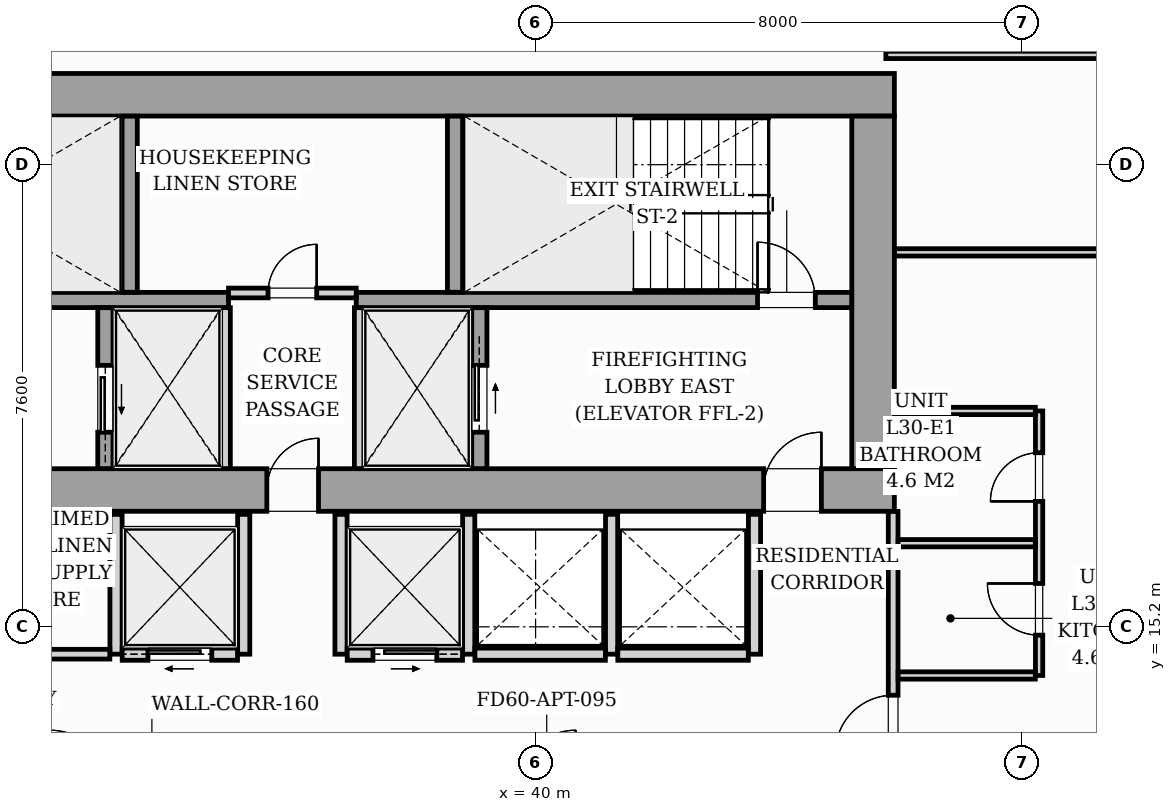
"""IFC4 building model, lengths in metres.
Left out: names, types, materials, properties, quantities, classifications, styles, units other than length and angle.
Written with IfcOpenShell. Run it as: python <this file> out.ifc"""

import sys

from ifc_helpers import new_model, si_unit, direction, frame, frame_2d, origin, origin_2d, place, context, subcontext, project, spatial, rectangle, i_section, extrude, source, transform, mapped, element, fill, save


model = new_model("IFC4")
c1 = context("Model", 3, precision=1e-05, world=origin(), true_north=direction((0.0, 1.0)))
c2 = subcontext(c1, "Body", "Model", "MODEL_VIEW")
j1 = project(units=[si_unit("LENGTHUNIT", "METRE"), si_unit("PLANEANGLEUNIT", "RADIAN")], contexts=[c1])
p1 = place(None, origin())
s1 = spatial("IfcSite", under=j1, at=p1, CompositionType="ELEMENT")
p2 = place(p1, origin())
s2 = spatial("IfcBuilding", under=s1, at=p2, CompositionType="ELEMENT")
p3 = place(p2, frame((0.0, 0.0, 106.6)))
s3 = spatial("IfcBuildingStorey", under=s2, at=p3, CompositionType="ELEMENT", Elevation=106.6)
m1 = source(origin(), c2, "Body", "SweptSolid", [
    extrude(i_section(OverallWidth=0.427, OverallDepth=0.483, WebThickness=0.051, FlangeThickness=0.082, FilletRadius=0.018, at=origin_2d()), origin(), (0.0, 0.0, 1.0), 3.196),
])
for number, where, z_axis, x_axis in (
    (1, (33.12, 17.4, 0.002), (0.0, 0.0, 1.0), (1.0, 0.0, 0.0)),
    (2, (38.88, 17.4, 0.002), (0.0, 0.0, 1.0), (1.0, 0.0, 0.0)),
    (3, (45.6, 17.4, 0.002), (0.0, 0.0, 1.0), (1.0, 0.0, 0.0)),
    (4, (33.12, 24.0, 0.002), (0.0, 0.0, 1.0), (1.0, 0.0, 0.0)),
    (5, (38.88, 24.0, 0.002), (0.0, 0.0, 1.0), (1.0, 0.0, 0.0)),
    (6, (45.6, 24.0, 0.002), (0.0, 0.0, 1.0), (1.0, 0.0, 0.0)),
):
    element("IfcColumn", number, at=place(p3, frame(where, z_axis=z_axis, x_axis=x_axis)), inside=s3, PredefinedType="PILASTER", context=c2, shape_type="MappedRepresentation", body=[
        mapped(m1, transform((0.0, 0.0, 0.0), scale=1.0)),
    ])
p4 = place(p3, frame((26.1, 17.45, 0.0), z_axis=(0.0, 0.0, 1.0), x_axis=(1.0, 0.0, 0.0)))
e7 = element("IfcWall", 7, at=p4, inside=s3, PredefinedType="SHEAR", context=c2, shape_type="SweptSolid", body=[
    extrude(rectangle(XDim=19.8, YDim=0.7, at=frame_2d((9.9, 0.0))), origin(), (0.0, 0.0, 1.0), 3.2),
])
p5 = place(p4, frame((1.05, 0.0, 0.0)))
e8 = element("IfcOpeningElement", 8, at=p5, cuts=e7, PredefinedType="OPENING", context=c2, shape_type="SweptSolid", body=[
    extrude(rectangle(XDim=0.95, YDim=2.06, at=frame_2d((0.475, 1.03))), frame((0.0, 0.36, 0.0), z_axis=(0.0, -1.0, 0.0), x_axis=(1.0, 0.0, 0.0)), (0.0, 0.0, 1.0), 0.72),
])
p6 = place(p4, frame((9.48, 0.0, 0.0)))
e9 = element("IfcOpeningElement", 9, at=p6, cuts=e7, PredefinedType="OPENING", context=c2, shape_type="SweptSolid", body=[
    extrude(rectangle(XDim=0.85, YDim=2.0, at=frame_2d((0.425, 1.0))), frame((0.0, 0.36, 0.0), z_axis=(0.0, -1.0, 0.0), x_axis=(1.0, 0.0, 0.0)), (0.0, 0.0, 1.0), 0.72),
])
p7 = place(p4, frame((17.65, 0.0, 0.0)))
e10 = element("IfcOpeningElement", 10, at=p7, cuts=e7, PredefinedType="OPENING", context=c2, shape_type="SweptSolid", body=[
    extrude(rectangle(XDim=0.95, YDim=2.06, at=frame_2d((0.475, 1.03))), frame((0.0, 0.36, 0.0), z_axis=(0.0, -1.0, 0.0), x_axis=(1.0, 0.0, 0.0)), (0.0, 0.0, 1.0), 0.72),
])
p8 = place(p3, frame((26.1, 23.95, 0.0), z_axis=(0.0, 0.0, 1.0), x_axis=(1.0, 0.0, 0.0)))
e11 = element("IfcWall", 11, at=p8, inside=s3, PredefinedType="SHEAR", context=c2, shape_type="SweptSolid", body=[
    extrude(rectangle(XDim=19.8, YDim=0.7, at=frame_2d((9.9, 0.0))), origin(), (0.0, 0.0, 1.0), 3.2),
])
p9 = place(p3, frame((45.55, 17.802, 0.0), z_axis=(0.0, 0.0, 1.0), x_axis=(0.0, 1.0, 0.0)))
e12 = element("IfcWall", 12, at=p9, inside=s3, PredefinedType="SHEAR", context=c2, shape_type="SweptSolid", body=[
    extrude(rectangle(XDim=5.796, YDim=0.7, at=frame_2d((2.898, 0.0))), origin(), (0.0, 0.0, 1.0), 3.2),
])
p10 = place(p3, frame((26.802, 20.575, 0.0), z_axis=(0.0, 0.0, 1.0), x_axis=(1.0, 0.0, 0.0)))
e13 = element("IfcWall", 13, at=p10, inside=s3, PredefinedType="SOLIDWALL", context=c2, shape_type="SweptSolid", body=[
    extrude(rectangle(XDim=8.148, YDim=0.25, at=frame_2d((4.074, 0.0))), origin(), (0.0, 0.0, 1.0), 3.2),
])
p11 = place(p10, frame((0.348, 0.0, 0.0)))
e14 = element("IfcOpeningElement", 14, at=p11, cuts=e13, PredefinedType="OPENING", context=c2, shape_type="SweptSolid", body=[
    extrude(rectangle(XDim=0.95, YDim=2.06, at=frame_2d((0.475, 1.03))), frame((0.0, 0.135, 0.0), z_axis=(0.0, -1.0, 0.0), x_axis=(1.0, 0.0, 0.0)), (0.0, 0.0, 1.0), 0.27),
])
p12 = place(p3, frame((37.05, 20.575, 0.0), z_axis=(0.0, 0.0, 1.0), x_axis=(1.0, 0.0, 0.0)))
e15 = element("IfcWall", 15, at=p12, inside=s3, PredefinedType="SOLIDWALL", context=c2, shape_type="SweptSolid", body=[
    extrude(rectangle(XDim=8.148, YDim=0.25, at=frame_2d((4.074, 0.0))), origin(), (0.0, 0.0, 1.0), 3.2),
])
p13 = place(p12, frame((6.6, 0.0, 0.0)))
e16 = element("IfcOpeningElement", 16, at=p13, cuts=e15, PredefinedType="OPENING", context=c2, shape_type="SweptSolid", body=[
    extrude(rectangle(XDim=0.95, YDim=2.06, at=frame_2d((0.475, 1.03))), frame((0.0, 0.135, 0.0), z_axis=(0.0, -1.0, 0.0), x_axis=(1.0, 0.0, 0.0)), (0.0, 0.0, 1.0), 0.27),
])
for number, where, z_axis, x_axis in (
    (17, (33.325, 20.702, 0.0), (0.0, 0.0, 1.0), (0.0, 1.0, 0.0)),
    (18, (38.675, 20.702, 0.0), (0.0, 0.0, 1.0), (0.0, 1.0, 0.0)),
):
    element("IfcWall", number, at=place(p3, frame(where, z_axis=z_axis, x_axis=x_axis)), inside=s3, PredefinedType="SOLIDWALL", context=c2, shape_type="SweptSolid", body=[
        extrude(rectangle(XDim=2.896, YDim=0.25, at=frame_2d((1.448, 0.0))), origin(), (0.0, 0.0, 1.0), 3.2),
    ])
p14 = place(p3, frame((32.925, 17.802, 0.0), z_axis=(0.0, 0.0, 1.0), x_axis=(0.0, 1.0, 0.0)))
e19 = element("IfcWall", 19, at=p14, inside=s3, PredefinedType="SOLIDWALL", context=c2, shape_type="SweptSolid", body=[
    extrude(rectangle(XDim=2.646, YDim=0.25, at=frame_2d((1.323, 0.0))), origin(), (0.0, 0.0, 1.0), 3.2),
])
p15 = place(p14, frame((0.598, 0.0, 0.0)))
e20 = element("IfcOpeningElement", 20, at=p15, cuts=e19, PredefinedType="OPENING", context=c2, shape_type="SweptSolid", body=[
    extrude(rectangle(XDim=1.1, YDim=2.08, at=frame_2d((0.55, 1.04))), frame((0.0, 0.135, 0.0), z_axis=(0.0, -1.0, 0.0), x_axis=(1.0, 0.0, 0.0)), (0.0, 0.0, 1.0), 0.27),
])
for number, where, z_axis, x_axis in (
    (21, (34.9, 17.802, 0.0), (0.0, 0.0, 1.0), (0.0, 1.0, 0.0)),
    (22, (37.1, 17.802, 0.0), (0.0, 0.0, 1.0), (0.0, 1.0, 0.0)),
):
    element("IfcWall", number, at=place(p3, frame(where, z_axis=z_axis, x_axis=x_axis)), inside=s3, PredefinedType="PARTITIONING", context=c2, shape_type="SweptSolid", body=[
        extrude(rectangle(XDim=2.646, YDim=0.16, at=frame_2d((1.323, 0.0))), origin(), (0.0, 0.0, 1.0), 2.94),
    ])
p16 = place(p3, frame((39.075, 17.802, 0.0), z_axis=(0.0, 0.0, 1.0), x_axis=(0.0, 1.0, 0.0)))
e23 = element("IfcWall", 23, at=p16, inside=s3, PredefinedType="SOLIDWALL", context=c2, shape_type="SweptSolid", body=[
    extrude(rectangle(XDim=2.646, YDim=0.25, at=frame_2d((1.323, 0.0))), origin(), (0.0, 0.0, 1.0), 3.2),
])
p17 = place(p16, frame((0.598, 0.0, 0.0)))
e24 = element("IfcOpeningElement", 24, at=p17, cuts=e23, PredefinedType="OPENING", context=c2, shape_type="SweptSolid", body=[
    extrude(rectangle(XDim=1.1, YDim=2.08, at=frame_2d((0.55, 1.04))), frame((0.0, 0.135, 0.0), z_axis=(0.0, -1.0, 0.0), x_axis=(1.0, 0.0, 0.0)), (0.0, 0.0, 1.0), 0.27),
])
p18 = place(p3, frame((34.95, 20.69, 0.0), z_axis=(0.0, 0.0, 1.0), x_axis=(1.0, 0.0, 0.0)))
e25 = element("IfcWall", 25, at=p18, inside=s3, PredefinedType="PARTITIONING", context=c2, shape_type="SweptSolid", body=[
    extrude(rectangle(XDim=2.1, YDim=0.16, at=frame_2d((1.05, 0.0))), origin(), (0.0, 0.0, 1.0), 2.94),
])
p19 = place(p18, frame((0.65, 0.0, 0.0)))
e26 = element("IfcOpeningElement", 26, at=p19, cuts=e25, PredefinedType="OPENING", context=c2, shape_type="SweptSolid", body=[
    extrude(rectangle(XDim=0.8, YDim=2.05, at=frame_2d((0.4, 1.025))), frame((0.0, 0.09, 0.0), z_axis=(0.0, -1.0, 0.0), x_axis=(1.0, 0.0, 0.0)), (0.0, 0.0, 1.0), 0.18),
])
p20 = place(p3, frame((33.1, 14.75, 0.0), z_axis=(0.0, 0.0, 1.0), x_axis=(0.0, 1.0, 0.0)))
e27 = element("IfcWall", 27, at=p20, inside=s3, PredefinedType="PARTITIONING", context=c2, shape_type="SweptSolid", body=[
    extrude(rectangle(XDim=2.3, YDim=0.2, at=frame_2d((1.15, 0.0))), origin(), (0.0, 0.0, 1.0), 2.94),
])
p21 = place(p3, frame((28.482, 14.75, 0.0), z_axis=(0.0, 0.0, 1.0), x_axis=(1.0, 0.0, 0.0)))
e28 = element("IfcWall", 28, at=p21, inside=s3, PredefinedType="PARTITIONING", context=c2, shape_type="SweptSolid", body=[
    extrude(rectangle(XDim=4.516, YDim=0.16, at=frame_2d((2.258, 0.0))), origin(), (0.0, 0.0, 1.0), 2.94),
])
p22 = place(p21, frame((1.868, 0.0, 0.0)))
e29 = element("IfcOpeningElement", 29, at=p22, cuts=e28, PredefinedType="OPENING", context=c2, shape_type="SweptSolid", body=[
    extrude(rectangle(XDim=0.8, YDim=2.05, at=frame_2d((0.4, 1.025))), frame((0.0, 0.09, 0.0), z_axis=(0.0, -1.0, 0.0), x_axis=(1.0, 0.0, 0.0)), (0.0, 0.0, 1.0), 0.18),
])
p23 = place(p3, frame((35.2, 14.75, 0.0), z_axis=(0.0, 0.0, 1.0), x_axis=(0.0, 1.0, 0.0)))
e30 = element("IfcWall", 30, at=p23, inside=s3, PredefinedType="PARTITIONING", context=c2, shape_type="SweptSolid", body=[
    extrude(rectangle(XDim=2.3, YDim=0.2, at=frame_2d((1.15, 0.0))), origin(), (0.0, 0.0, 1.0), 2.94),
])
p24 = place(p3, frame((33.202, 14.75, 0.0), z_axis=(0.0, 0.0, 1.0), x_axis=(1.0, 0.0, 0.0)))
e31 = element("IfcWall", 31, at=p24, inside=s3, PredefinedType="PARTITIONING", context=c2, shape_type="SweptSolid", body=[
    extrude(rectangle(XDim=1.896, YDim=0.2, at=frame_2d((0.948, 0.0))), origin(), (0.0, 0.0, 1.0), 2.94),
])
p25 = place(p24, frame((0.423, 0.0, 0.0)))
e32 = element("IfcOpeningElement", 32, at=p25, cuts=e31, PredefinedType="OPENING", context=c2, shape_type="SweptSolid", body=[
    extrude(rectangle(XDim=1.05, YDim=2.08, at=frame_2d((0.525, 1.04))), frame((0.0, 0.11, 0.0), z_axis=(0.0, -1.0, 0.0), x_axis=(1.0, 0.0, 0.0)), (0.0, 0.0, 1.0), 0.22),
])
for number, where, z_axis, x_axis in (
    (33, (36.8, 14.75, 0.0), (0.0, 0.0, 1.0), (0.0, 1.0, 0.0)),
    (34, (38.9, 14.75, 0.0), (0.0, 0.0, 1.0), (0.0, 1.0, 0.0)),
):
    element("IfcWall", number, at=place(p3, frame(where, z_axis=z_axis, x_axis=x_axis)), inside=s3, PredefinedType="PARTITIONING", context=c2, shape_type="SweptSolid", body=[
        extrude(rectangle(XDim=2.3, YDim=0.2, at=frame_2d((1.15, 0.0))), origin(), (0.0, 0.0, 1.0), 2.94),
    ])
p26 = place(p3, frame((36.902, 14.75, 0.0), z_axis=(0.0, 0.0, 1.0), x_axis=(1.0, 0.0, 0.0)))
e35 = element("IfcWall", 35, at=p26, inside=s3, PredefinedType="PARTITIONING", context=c2, shape_type="SweptSolid", body=[
    extrude(rectangle(XDim=1.896, YDim=0.2, at=frame_2d((0.948, 0.0))), origin(), (0.0, 0.0, 1.0), 2.94),
])
p27 = place(p26, frame((0.423, 0.0, 0.0)))
e36 = element("IfcOpeningElement", 36, at=p27, cuts=e35, PredefinedType="OPENING", context=c2, shape_type="SweptSolid", body=[
    extrude(rectangle(XDim=1.05, YDim=2.08, at=frame_2d((0.525, 1.04))), frame((0.0, 0.11, 0.0), z_axis=(0.0, -1.0, 0.0), x_axis=(1.0, 0.0, 0.0)), (0.0, 0.0, 1.0), 0.22),
])
for number, where, z_axis, x_axis in (
    (37, (41.25, 14.75, 0.0), (0.0, 0.0, 1.0), (0.0, 1.0, 0.0)),
    (38, (43.6, 14.75, 0.0), (0.0, 0.0, 1.0), (0.0, 1.0, 0.0)),
):
    element("IfcWall", number, at=place(p3, frame(where, z_axis=z_axis, x_axis=x_axis)), inside=s3, PredefinedType="PARTITIONING", context=c2, shape_type="SweptSolid", body=[
        extrude(rectangle(XDim=2.3, YDim=0.2, at=frame_2d((1.15, 0.0))), origin(), (0.0, 0.0, 1.0), 2.94),
    ])
for number, where, z_axis, x_axis in (
    (39, (39.002, 14.75, 0.0), (0.0, 0.0, 1.0), (1.0, 0.0, 0.0)),
    (40, (41.352, 14.75, 0.0), (0.0, 0.0, 1.0), (1.0, 0.0, 0.0)),
):
    element("IfcWall", number, at=place(p3, frame(where, z_axis=z_axis, x_axis=x_axis)), inside=s3, PredefinedType="PARTITIONING", context=c2, shape_type="SweptSolid", body=[
        extrude(rectangle(XDim=2.146, YDim=0.2, at=frame_2d((1.073, 0.0))), origin(), (0.0, 0.0, 1.0), 2.94),
    ])
p28 = place(p3, frame((45.88, 12.632, 0.0), z_axis=(0.0, 0.0, 1.0), x_axis=(0.0, 1.0, 0.0)))
e41 = element("IfcWall", 41, at=p28, inside=s3, PredefinedType="PARTITIONING", context=c2, shape_type="SweptSolid", body=[
    extrude(rectangle(XDim=4.466, YDim=0.16, at=frame_2d((2.233, 0.0))), origin(), (0.0, 0.0, 1.0), 2.94),
])
p29 = place(p28, frame((0.493, 0.0, 0.0)))
e42 = element("IfcOpeningElement", 42, at=p29, cuts=e41, PredefinedType="OPENING", context=c2, shape_type="SweptSolid", body=[
    extrude(rectangle(XDim=0.95, YDim=2.06, at=frame_2d((0.475, 1.03))), frame((0.0, 0.09, 0.0), z_axis=(0.0, -1.0, 0.0), x_axis=(1.0, 0.0, 0.0)), (0.0, 0.0, 1.0), 0.18),
])
p30 = place(p3, frame((48.28, 14.4, 0.0), z_axis=(0.0, 0.0, 1.0), x_axis=(0.0, 1.0, 0.0)))
e43 = element("IfcWall", 43, at=p30, inside=s3, PredefinedType="PARTITIONING", context=c2, shape_type="SweptSolid", body=[
    extrude(rectangle(XDim=4.35, YDim=0.12, at=frame_2d((2.175, 0.0))), origin(), (0.0, 0.0, 1.0), 2.94),
])
p31 = place(p30, frame((0.663, 0.0, 0.0)))
e44 = element("IfcOpeningElement", 44, at=p31, cuts=e43, PredefinedType="OPENING", context=c2, shape_type="SweptSolid", body=[
    extrude(rectangle(XDim=0.85, YDim=2.05, at=frame_2d((0.425, 1.025))), frame((0.0, 0.07, 0.0), z_axis=(0.0, -1.0, 0.0), x_axis=(1.0, 0.0, 0.0)), (0.0, 0.0, 1.0), 0.14),
])
p32 = place(p30, frame((2.863, 0.0, 0.0)))
e45 = element("IfcOpeningElement", 45, at=p32, cuts=e43, PredefinedType="OPENING", context=c2, shape_type="SweptSolid", body=[
    extrude(rectangle(XDim=0.8, YDim=2.02, at=frame_2d((0.4, 1.01))), frame((0.0, 0.07, 0.0), z_axis=(0.0, -1.0, 0.0), x_axis=(1.0, 0.0, 0.0)), (0.0, 0.0, 1.0), 0.14),
])
for number, where, z_axis, x_axis in (
    (46, (45.962, 16.575, 0.0), (0.0, 0.0, 1.0), (1.0, 0.0, 0.0)),
    (47, (45.962, 14.4, 0.0), (0.0, 0.0, 1.0), (1.0, 0.0, 0.0)),
):
    element("IfcWall", number, at=place(p3, frame(where, z_axis=z_axis, x_axis=x_axis)), inside=s3, PredefinedType="PARTITIONING", context=c2, shape_type="SweptSolid", body=[
        extrude(rectangle(XDim=2.256, YDim=0.12, at=frame_2d((1.128, 0.0))), origin(), (0.0, 0.0, 1.0), 2.94),
    ])
p33 = place(p3, frame((45.902, 18.75, 0.0), z_axis=(0.0, 0.0, 1.0), x_axis=(1.0, 0.0, 0.0)))
e48 = element("IfcWall", 48, at=p33, inside=s3, PredefinedType="PARTITIONING", context=c2, shape_type="SweptSolid", body=[
    extrude(rectangle(XDim=2.316, YDim=0.12, at=frame_2d((1.158, 0.0))), origin(), (0.0, 0.0, 1.0), 2.94),
])
p34 = place(p3, frame((45.76, 24.605, 0.0), z_axis=(0.0, 0.0, 1.0), x_axis=(1.0, 0.0, 0.0)))
e49 = element("IfcWall", 49, at=p34, inside=s3, PredefinedType="PARTITIONING", context=c2, shape_type="SweptSolid", body=[
    extrude(rectangle(XDim=22.498, YDim=0.12, at=frame_2d((11.249, 0.0))), origin(), (0.0, 0.0, 1.0), 2.94),
])
p35 = place(p34, frame((10.931, 0.0, 0.0)))
e50 = element("IfcOpeningElement", 50, at=p35, cuts=e49, PredefinedType="OPENING", context=c2, shape_type="SweptSolid", body=[
    extrude(rectangle(XDim=0.85, YDim=2.05, at=frame_2d((0.425, 1.025))), frame((0.0, 0.07, 0.0), z_axis=(0.0, -1.0, 0.0), x_axis=(1.0, 0.0, 0.0)), (0.0, 0.0, 1.0), 0.14),
])
p36 = place(p3, frame((45.902, 21.358, 0.0), z_axis=(0.0, 0.0, 1.0), x_axis=(1.0, 0.0, 0.0)))
e51 = element("IfcWall", 51, at=p36, inside=s3, PredefinedType="PARTITIONING", context=c2, shape_type="SweptSolid", body=[
    extrude(rectangle(XDim=22.668, YDim=0.12, at=frame_2d((11.334, 0.0))), origin(), (0.0, 0.0, 1.0), 2.94),
])
p37 = place(p36, frame((10.945, 0.0, 0.0)))
e52 = element("IfcOpeningElement", 52, at=p37, cuts=e51, PredefinedType="OPENING", context=c2, shape_type="SweptSolid", body=[
    extrude(rectangle(XDim=0.85, YDim=2.05, at=frame_2d((0.425, 1.025))), frame((0.0, 0.07, 0.0), z_axis=(0.0, -1.0, 0.0), x_axis=(1.0, 0.0, 0.0)), (0.0, 0.0, 1.0), 0.14),
])
m2 = source(origin(), c2, "Body", "SweptSolid", [
    extrude(rectangle(XDim=0.85, YDim=2.0, at=frame_2d((0.425, 1.0))), frame((0.0, 0.025, 0.0), z_axis=(0.0, -1.0, 0.0), x_axis=(1.0, 0.0, 0.0)), (0.0, 0.0, 1.0), 0.05),
])
p38 = place(p6, origin())
e53 = element("IfcDoor", 53, at=p38, inside=s3, OperationType="SINGLE_SWING_RIGHT", PredefinedType="DOOR", context=c2, shape_type="MappedRepresentation", body=[
    mapped(m2, transform((0.0, 0.0, 0.0), scale=1.0)),
])
fill(e9, e53)
m3 = source(origin(), c2, "Body", "SweptSolid", [
    extrude(rectangle(XDim=0.95, YDim=2.06, at=frame_2d((0.475, 1.03))), frame((0.0, 0.025, 0.0), z_axis=(0.0, -1.0, 0.0), x_axis=(1.0, 0.0, 0.0)), (0.0, 0.0, 1.0), 0.05),
])
p39 = place(p7, origin())
e54 = element("IfcDoor", 54, at=p39, inside=s3, OperationType="SINGLE_SWING_RIGHT", PredefinedType="DOOR", context=c2, shape_type="MappedRepresentation", body=[
    mapped(m3, transform((0.0, 0.0, 0.0), scale=1.0)),
])
fill(e10, e54)
p40 = place(p13, origin())
e55 = element("IfcDoor", 55, at=p40, inside=s3, OperationType="SINGLE_SWING_LEFT", PredefinedType="DOOR", context=c2, shape_type="MappedRepresentation", body=[
    mapped(m3, transform((0.0, 0.0, 0.0), scale=1.0)),
])
fill(e16, e55)
m4 = source(origin(), c2, "Body", "SweptSolid", [
    extrude(rectangle(XDim=1.1, YDim=2.08, at=frame_2d((0.55, 1.04))), frame((0.0, 0.025, 0.0), z_axis=(0.0, -1.0, 0.0), x_axis=(1.0, 0.0, 0.0)), (0.0, 0.0, 1.0), 0.05),
])
p41 = place(p15, origin())
e56 = element("IfcDoor", 56, at=p41, inside=s3, OperationType="SLIDING_TO_LEFT", PredefinedType="DOOR", context=c2, shape_type="MappedRepresentation", body=[
    mapped(m4, transform((0.0, 0.0, 0.0), scale=1.0)),
])
fill(e20, e56)
p42 = place(p17, origin())
e57 = element("IfcDoor", 57, at=p42, inside=s3, OperationType="SLIDING_TO_RIGHT", PredefinedType="DOOR", context=c2, shape_type="MappedRepresentation", body=[
    mapped(m4, transform((0.0, 0.0, 0.0), scale=1.0)),
])
fill(e24, e57)
m5 = source(origin(), c2, "Body", "SweptSolid", [
    extrude(rectangle(XDim=0.8, YDim=2.05, at=frame_2d((0.4, 1.025))), frame((0.0, 0.025, 0.0), z_axis=(0.0, -1.0, 0.0), x_axis=(1.0, 0.0, 0.0)), (0.0, 0.0, 1.0), 0.05),
])
p43 = place(p19, origin())
e58 = element("IfcDoor", 58, at=p43, inside=s3, OperationType="SINGLE_SWING_RIGHT", PredefinedType="DOOR", context=c2, shape_type="MappedRepresentation", body=[
    mapped(m5, transform((0.0, 0.0, 0.0), scale=1.0)),
])
fill(e26, e58)
m6 = source(origin(), c2, "Body", "SweptSolid", [
    extrude(rectangle(XDim=1.05, YDim=2.08, at=frame_2d((0.525, 1.04))), frame((0.0, 0.025, 0.0), z_axis=(0.0, -1.0, 0.0), x_axis=(1.0, 0.0, 0.0)), (0.0, 0.0, 1.0), 0.05),
])
p44 = place(p25, origin())
e59 = element("IfcDoor", 59, at=p44, inside=s3, OperationType="SLIDING_TO_LEFT", PredefinedType="DOOR", context=c2, shape_type="MappedRepresentation", body=[
    mapped(m6, transform((0.0, 0.0, 0.0), scale=1.0)),
])
fill(e32, e59)
p45 = place(p27, origin())
e60 = element("IfcDoor", 60, at=p45, inside=s3, OperationType="SLIDING_TO_RIGHT", PredefinedType="DOOR", context=c2, shape_type="MappedRepresentation", body=[
    mapped(m6, transform((0.0, 0.0, 0.0), scale=1.0)),
])
fill(e36, e60)
m7 = source(origin(), c2, "Body", "SweptSolid", [
    extrude(rectangle(XDim=0.95, YDim=2.06, at=frame_2d((0.475, 1.03))), frame((0.0, 0.025, 0.0), z_axis=(0.0, -1.0, 0.0), x_axis=(1.0, 0.0, 0.0)), (0.0, 0.0, 1.0), 0.05),
])
p46 = place(p29, origin())
e61 = element("IfcDoor", 61, at=p46, inside=s3, OperationType="SINGLE_SWING_LEFT", PredefinedType="DOOR", context=c2, shape_type="MappedRepresentation", body=[
    mapped(m7, transform((0.0, 0.0, 0.0), scale=1.0)),
])
fill(e42, e61)
m8 = source(origin(), c2, "Body", "SweptSolid", [
    extrude(rectangle(XDim=0.85, YDim=2.05, at=frame_2d((0.425, 1.025))), frame((0.0, 0.025, 0.0), z_axis=(0.0, -1.0, 0.0), x_axis=(1.0, 0.0, 0.0)), (0.0, 0.0, 1.0), 0.05),
])
p47 = place(p31, origin())
e62 = element("IfcDoor", 62, at=p47, inside=s3, OperationType="SINGLE_SWING_RIGHT", PredefinedType="DOOR", context=c2, shape_type="MappedRepresentation", body=[
    mapped(m8, transform((0.0, 0.0, 0.0), scale=1.0)),
])
fill(e44, e62)
m9 = source(origin(), c2, "Body", "SweptSolid", [
    extrude(rectangle(XDim=0.8, YDim=2.02, at=frame_2d((0.4, 1.01))), frame((0.0, 0.025, 0.0), z_axis=(0.0, -1.0, 0.0), x_axis=(1.0, 0.0, 0.0)), (0.0, 0.0, 1.0), 0.05),
])
p48 = place(p32, origin())
e63 = element("IfcDoor", 63, at=p48, inside=s3, OperationType="SINGLE_SWING_LEFT", PredefinedType="DOOR", context=c2, shape_type="MappedRepresentation", body=[
    mapped(m9, transform((0.0, 0.0, 0.0), scale=1.0)),
])
fill(e45, e63)
save(model, sys.argv[1])
